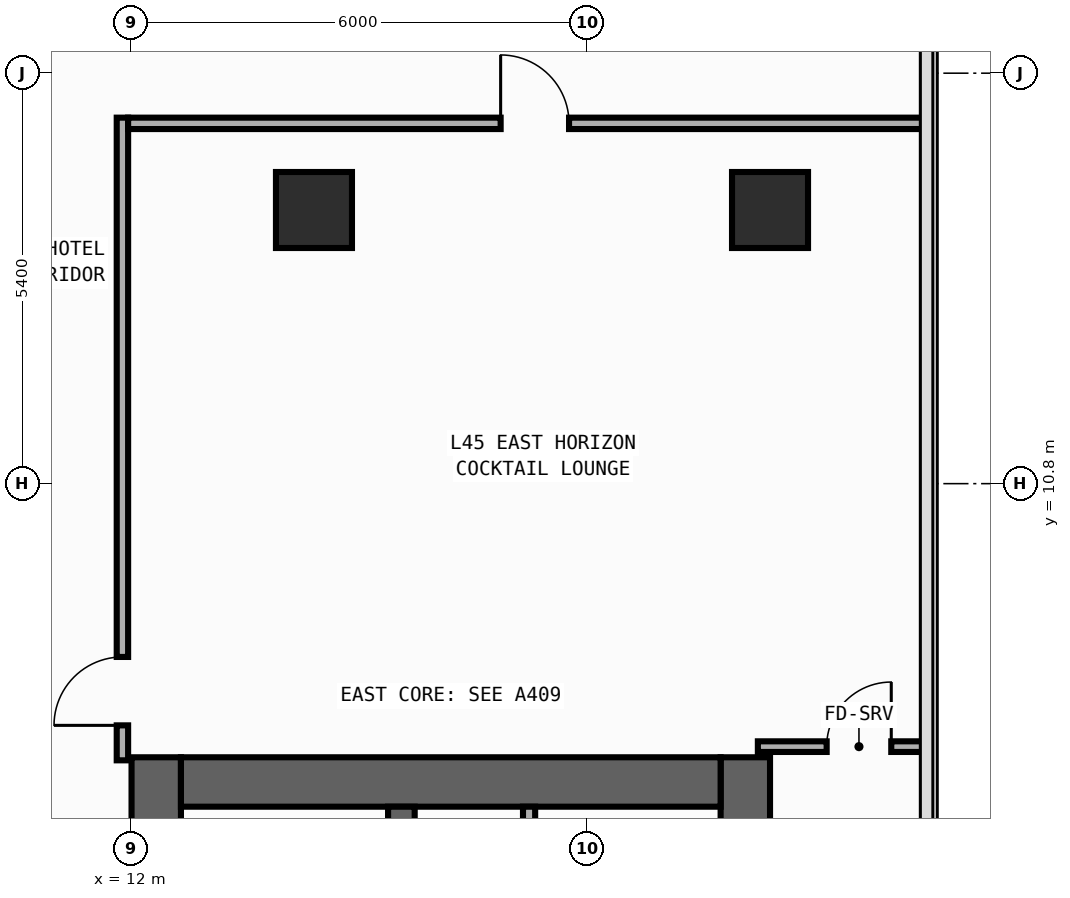
"""IFC4 building model, lengths in metres.
Left out: names, types, materials, properties, quantities, classifications, styles, units other than length and angle.
Written with IfcOpenShell. Run it as: python <this file> out.ifc"""

import sys

from ifc_helpers import new_model, si_unit, direction, frame, frame_2d, origin, origin_2d, place, context, subcontext, project, spatial, rectangle, extrude, element, fill, save


model = new_model("IFC4")
c1 = context("Model", 3, precision=1e-05, world=origin(), true_north=direction((0.0, 1.0)))
c2 = subcontext(c1, "Body", "Model", "MODEL_VIEW")
j1 = project(units=[si_unit("LENGTHUNIT", "METRE"), si_unit("PLANEANGLEUNIT", "RADIAN")], contexts=[c1])
p1 = place(None, origin())
s1 = spatial("IfcSite", under=j1, at=p1, CompositionType="ELEMENT")
p2 = place(p1, origin())
s2 = spatial("IfcBuilding", under=s1, at=p2, CompositionType="ELEMENT")
p3 = place(p2, frame((0.0, 0.0, 195.4)))
s3 = spatial("IfcBuildingStorey", under=s2, at=p3, CompositionType="ELEMENT", Elevation=195.4)
p4 = place(p3, frame((12.325, -19.8, 0.0), z_axis=(0.0, 0.0, 1.0), x_axis=(0.0, 1.0, 0.0)))
e1 = element("IfcWall", 1, at=p4, inside=s3, PredefinedType="SHEAR", context=c2, shape_type="SweptSolid", body=[
    extrude(rectangle(XDim=27.0, YDim=0.65, at=frame_2d((13.5, 0.0))), origin(), (0.0, 0.0, 1.0), 3.54),
])
p5 = place(p4, frame((23.05, 0.0, 0.0)))
e2 = element("IfcOpeningElement", 2, at=p5, cuts=e1, PredefinedType="OPENING", context=c2, shape_type="SweptSolid", body=[
    extrude(rectangle(XDim=1.1, YDim=2.2, at=frame_2d((0.55, 1.1))), frame((0.0, 0.335, 0.0), z_axis=(0.0, -1.0, 0.0), x_axis=(1.0, 0.0, 0.0)), (0.0, 0.0, 1.0), 0.67),
])
p6 = place(p4, frame((19.85, 0.0, 0.0)))
e3 = element("IfcOpeningElement", 3, at=p6, cuts=e1, PredefinedType="OPENING", context=c2, shape_type="SweptSolid", body=[
    extrude(rectangle(XDim=1.1, YDim=2.2, at=frame_2d((0.55, 1.1))), frame((0.0, 0.335, 0.0), z_axis=(0.0, -1.0, 0.0), x_axis=(1.0, 0.0, 0.0)), (0.0, 0.0, 1.0), 0.67),
])
p7 = place(p4, frame((16.65, 0.0, 0.0)))
e4 = element("IfcOpeningElement", 4, at=p7, cuts=e1, PredefinedType="OPENING", context=c2, shape_type="SweptSolid", body=[
    extrude(rectangle(XDim=1.1, YDim=2.2, at=frame_2d((0.55, 1.1))), frame((0.0, 0.335, 0.0), z_axis=(0.0, -1.0, 0.0), x_axis=(1.0, 0.0, 0.0)), (0.0, 0.0, 1.0), 0.67),
])
p8 = place(p4, frame((10.175, 0.0, 0.0)))
e5 = element("IfcOpeningElement", 5, at=p8, cuts=e1, PredefinedType="OPENING", context=c2, shape_type="SweptSolid", body=[
    extrude(rectangle(XDim=0.85, YDim=2.1, at=frame_2d((0.425, 1.05))), frame((0.0, 0.335, 0.0), z_axis=(0.0, -1.0, 0.0), x_axis=(1.0, 0.0, 0.0)), (0.0, 0.0, 1.0), 0.67),
])
p9 = place(p4, frame((12.725, 0.0, 0.0)))
e6 = element("IfcOpeningElement", 6, at=p9, cuts=e1, PredefinedType="OPENING", context=c2, shape_type="SweptSolid", body=[
    extrude(rectangle(XDim=1.15, YDim=2.2, at=frame_2d((0.575, 1.1))), frame((0.0, 0.335, 0.0), z_axis=(0.0, -1.0, 0.0), x_axis=(1.0, 0.0, 0.0)), (0.0, 0.0, 1.0), 0.67),
])
p10 = place(p4, frame((25.125, 0.0, 0.0)))
e7 = element("IfcOpeningElement", 7, at=p10, cuts=e1, PredefinedType="OPENING", context=c2, shape_type="SweptSolid", body=[
    extrude(rectangle(XDim=0.85, YDim=2.1, at=frame_2d((0.425, 1.05))), frame((0.0, 0.335, 0.0), z_axis=(0.0, -1.0, 0.0), x_axis=(1.0, 0.0, 0.0)), (0.0, 0.0, 1.0), 0.67),
])
p11 = place(p3, frame((20.075, -19.8, 0.0), z_axis=(0.0, 0.0, 1.0), x_axis=(0.0, 1.0, 0.0)))
e8 = element("IfcWall", 8, at=p11, inside=s3, PredefinedType="SHEAR", context=c2, shape_type="SweptSolid", body=[
    extrude(rectangle(XDim=27.0, YDim=0.65, at=frame_2d((13.5, 0.0))), origin(), (0.0, 0.0, 1.0), 3.54),
])
p12 = place(p3, frame((12.65, 6.875, 0.0), z_axis=(0.0, 0.0, 1.0), x_axis=(1.0, 0.0, 0.0)))
e9 = element("IfcWall", 9, at=p12, inside=s3, PredefinedType="SHEAR", context=c2, shape_type="SweptSolid", body=[
    extrude(rectangle(XDim=7.1, YDim=0.65, at=frame_2d((3.55, 0.0))), origin(), (0.0, 0.0, 1.0), 3.54),
])
p13 = place(p3, frame((15.55, -19.15, 0.0), z_axis=(0.0, 0.0, 1.0), x_axis=(0.0, 1.0, 0.0)))
e10 = element("IfcWall", 10, at=p13, inside=s3, PredefinedType="SHEAR", context=c2, shape_type="SweptSolid", body=[
    extrude(rectangle(XDim=25.7, YDim=0.35, at=frame_2d((12.85, 0.0))), origin(), (0.0, 0.0, 1.0), 3.54),
])
p14 = place(p13, frame((12.075, 0.0, 0.0)))
e11 = element("IfcOpeningElement", 11, at=p14, cuts=e10, PredefinedType="OPENING", context=c2, shape_type="SweptSolid", body=[
    extrude(rectangle(XDim=1.15, YDim=2.2, at=frame_2d((0.575, 1.1))), frame((0.0, 0.185, 0.0), z_axis=(0.0, -1.0, 0.0), x_axis=(1.0, 0.0, 0.0)), (0.0, 0.0, 1.0), 0.37),
])
p15 = place(p13, frame((24.475, 0.0, 0.0)))
e12 = element("IfcOpeningElement", 12, at=p15, cuts=e10, PredefinedType="OPENING", context=c2, shape_type="SweptSolid", body=[
    extrude(rectangle(XDim=0.85, YDim=2.1, at=frame_2d((0.425, 1.05))), frame((0.0, 0.185, 0.0), z_axis=(0.0, -1.0, 0.0), x_axis=(1.0, 0.0, 0.0)), (0.0, 0.0, 1.0), 0.37),
])
for number, where, z_axis, x_axis in (
    (13, (20.4, 14.4, 0.0), (0.0, 0.0, 1.0), (1.0, 0.0, 0.0)),
    (14, (14.4, 14.4, 0.0), (0.0, 0.0, 1.0), (1.0, 0.0, 0.0)),
):
    element("IfcColumn", number, at=place(p3, frame(where, z_axis=z_axis, x_axis=x_axis)), inside=s3, PredefinedType="COLUMN", context=c2, shape_type="SweptSolid", body=[
        extrude(rectangle(XDim=1.0, YDim=1.0, at=origin_2d()), origin(), (0.0, 0.0, 1.0), 3.8),
    ])
p16 = place(p3, frame((17.23, 4.17, 0.0), z_axis=(0.0, 0.0, 1.0), x_axis=(0.0, 1.0, 0.0)))
e15 = element("IfcWall", 15, at=p16, inside=s3, PredefinedType="PARTITIONING", context=c2, shape_type="SweptSolid", body=[
    extrude(rectangle(XDim=2.38, YDim=0.16, at=frame_2d((1.19, 0.0))), origin(), (0.0, 0.0, 1.0), 3.54),
])
p17 = place(p16, frame((0.46, 0.0, 0.0)))
e16 = element("IfcOpeningElement", 16, at=p17, cuts=e15, PredefinedType="OPENING", context=c2, shape_type="SweptSolid", body=[
    extrude(rectangle(XDim=0.85, YDim=2.1, at=frame_2d((0.425, 1.05))), frame((0.0, 0.09, 0.0), z_axis=(0.0, -1.0, 0.0), x_axis=(1.0, 0.0, 0.0)), (0.0, 0.0, 1.0), 0.18),
])
p18 = place(p3, frame((11.88, 7.16, 0.0), z_axis=(0.0, 0.0, 1.0), x_axis=(0.0, 1.0, 0.0)))
e17 = element("IfcWall", 17, at=p18, inside=s3, PredefinedType="PARTITIONING", context=c2, shape_type="SweptSolid", body=[
    extrude(rectangle(XDim=8.455, YDim=0.15, at=frame_2d((4.228, 0.0))), origin(), (0.0, 0.0, 1.0), 3.54),
])
p19 = place(p18, frame((0.46, 0.0, 0.0)))
e18 = element("IfcOpeningElement", 18, at=p19, cuts=e17, PredefinedType="OPENING", context=c2, shape_type="SweptSolid", body=[
    extrude(rectangle(XDim=0.9, YDim=2.15, at=frame_2d((0.45, 1.075))), frame((0.0, 0.085, 0.0), z_axis=(0.0, -1.0, 0.0), x_axis=(1.0, 0.0, 0.0)), (0.0, 0.0, 1.0), 0.17),
])
p20 = place(p3, frame((11.955, 15.54, 0.0), z_axis=(0.0, 0.0, 1.0), x_axis=(1.0, 0.0, 0.0)))
e19 = element("IfcWall", 19, at=p20, inside=s3, PredefinedType="PARTITIONING", context=c2, shape_type="SweptSolid", body=[
    extrude(rectangle(XDim=10.5, YDim=0.15, at=frame_2d((5.25, 0.0))), origin(), (0.0, 0.0, 1.0), 3.54),
])
p21 = place(p20, frame((4.901, 0.0, 0.0)))
e20 = element("IfcOpeningElement", 20, at=p21, cuts=e19, PredefinedType="OPENING", context=c2, shape_type="SweptSolid", body=[
    extrude(rectangle(XDim=0.9, YDim=2.15, at=frame_2d((0.45, 1.075))), frame((0.0, 0.085, 0.0), z_axis=(0.0, -1.0, 0.0), x_axis=(1.0, 0.0, 0.0)), (0.0, 0.0, 1.0), 0.17),
])
p22 = place(p3, frame((20.24, 7.34, 0.0), z_axis=(0.0, 0.0, 1.0), x_axis=(1.0, 0.0, 0.0)))
e21 = element("IfcWall", 21, at=p22, inside=s3, PredefinedType="PARTITIONING", context=c2, shape_type="SweptSolid", body=[
    extrude(rectangle(XDim=2.215, YDim=0.14, at=frame_2d((1.107, 0.0))), origin(), (0.0, 0.0, 1.0), 3.54),
])
p23 = place(p22, frame((0.905, 0.0, 0.0)))
e22 = element("IfcOpeningElement", 22, at=p23, cuts=e21, PredefinedType="OPENING", context=c2, shape_type="SweptSolid", body=[
    extrude(rectangle(XDim=0.85, YDim=2.1, at=frame_2d((0.425, 1.05))), frame((0.0, 0.08, 0.0), z_axis=(0.0, -1.0, 0.0), x_axis=(1.0, 0.0, 0.0)), (0.0, 0.0, 1.0), 0.16),
])
p24 = place(p19, origin())
e23 = element("IfcDoor", 23, at=p24, inside=s3, OperationType="SINGLE_SWING_LEFT", PredefinedType="DOOR", context=c2, shape_type="SweptSolid", body=[
    extrude(rectangle(XDim=0.9, YDim=2.15, at=frame_2d((0.45, 1.075))), frame((0.0, 0.025, 0.0), z_axis=(0.0, -1.0, 0.0), x_axis=(1.0, 0.0, 0.0)), (0.0, 0.0, 1.0), 0.05),
])
fill(e18, e23)
p25 = place(p21, origin())
e24 = element("IfcDoor", 24, at=p25, inside=s3, OperationType="SINGLE_SWING_LEFT", PredefinedType="DOOR", context=c2, shape_type="SweptSolid", body=[
    extrude(rectangle(XDim=0.9, YDim=2.15, at=frame_2d((0.45, 1.075))), frame((0.0, 0.025, 0.0), z_axis=(0.0, -1.0, 0.0), x_axis=(1.0, 0.0, 0.0)), (0.0, 0.0, 1.0), 0.05),
])
fill(e20, e24)
p26 = place(p23, origin())
e25 = element("IfcDoor", 25, at=p26, inside=s3, OperationType="SINGLE_SWING_RIGHT", PredefinedType="DOOR", context=c2, shape_type="SweptSolid", body=[
    extrude(rectangle(XDim=0.85, YDim=2.1, at=frame_2d((0.425, 1.05))), frame((0.0, 0.025, 0.0), z_axis=(0.0, -1.0, 0.0), x_axis=(1.0, 0.0, 0.0)), (0.0, 0.0, 1.0), 0.05),
])
fill(e22, e25)
save(model, sys.argv[1])
